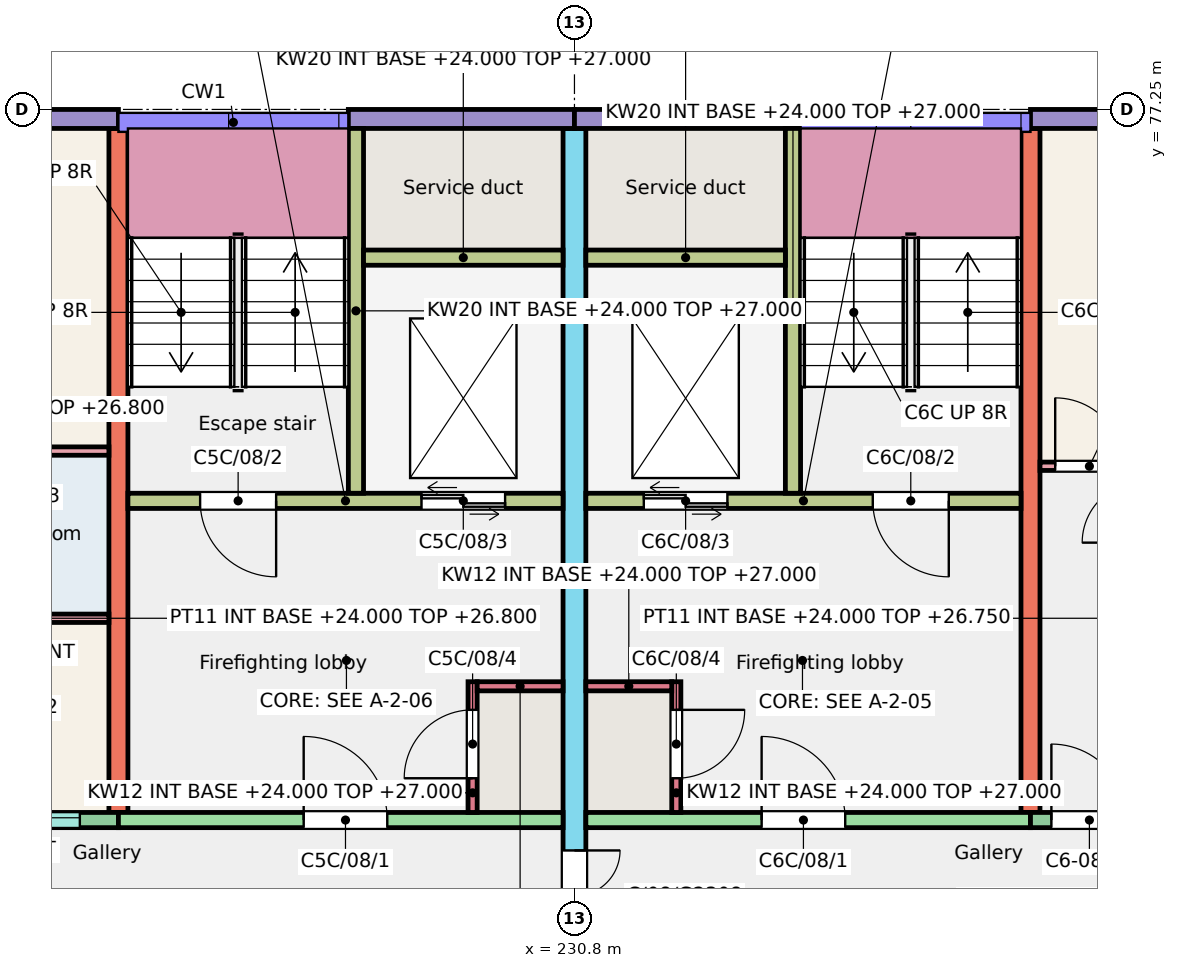
"""IFC4 building model, lengths in metres.
Left out: names, types, materials, properties, quantities, classifications, styles, units other than length and angle.
Written with IfcOpenShell. Run it as: python <this file> out.ifc"""

import sys

from ifc_helpers import new_model, si_unit, direction, frame, frame_2d, origin, place, context, subcontext, project, spatial, rectangle, extrude, element, fill, save


model = new_model("IFC4")
c1 = context("Model", 3, precision=1e-05, world=origin(), true_north=direction((0.0, 1.0)))
c2 = subcontext(c1, "Body", "Model", "MODEL_VIEW")
j1 = project(units=[si_unit("LENGTHUNIT", "METRE"), si_unit("PLANEANGLEUNIT", "RADIAN")], contexts=[c1])
p1 = place(None, origin())
s1 = spatial("IfcSite", under=j1, at=p1, CompositionType="ELEMENT")
p2 = place(p1, origin())
s2 = spatial("IfcBuilding", under=s1, at=p2, CompositionType="ELEMENT")
p3 = place(p2, frame((0.0, 0.0, 24.0)))
s3 = spatial("IfcBuildingStorey", under=s2, at=p3, CompositionType="ELEMENT", Elevation=24.0)
p4 = place(p3, frame((224.8, 68.0, 0.0), z_axis=(0.0, 0.0, 1.0), x_axis=(0.0, 1.0, 0.0)))
e1 = element("IfcWall", 1, at=p4, inside=s3, PredefinedType="SHEAR", context=c2, shape_type="SweptSolid", body=[
    extrude(rectangle(XDim=9.0, YDim=0.25, at=frame_2d((4.5, 0.0))), origin(), (0.0, 0.0, 1.0), 3.0),
])
p5 = place(p3, frame((230.8, 66.0, 0.0), z_axis=(0.0, 0.0, 1.0), x_axis=(0.0, 1.0, 0.0)))
e2 = element("IfcWall", 2, at=p5, inside=s3, PredefinedType="SHEAR", context=c2, shape_type="SweptSolid", body=[
    extrude(rectangle(XDim=11.0, YDim=0.3, at=frame_2d((5.5, 0.0))), origin(), (0.0, 0.0, 1.0), 3.0),
])
p6 = place(p5, frame((0.3, 0.0, 0.0)))
e3 = element("IfcOpeningElement", 3, at=p6, cuts=e2, PredefinedType="OPENING", context=c2, shape_type="SweptSolid", body=[
    extrude(rectangle(XDim=1.2, YDim=2.1, at=frame_2d((0.6, 1.05))), frame((0.0, 0.16, 0.0), z_axis=(0.0, -1.0, 0.0), x_axis=(1.0, 0.0, 0.0)), (0.0, 0.0, 1.0), 0.32),
])
p7 = place(p3, frame((236.8, 68.0, 0.0), z_axis=(0.0, 0.0, 1.0), x_axis=(0.0, 1.0, 0.0)))
e4 = element("IfcWall", 4, at=p7, inside=s3, PredefinedType="SHEAR", context=c2, shape_type="SweptSolid", body=[
    extrude(rectangle(XDim=9.0, YDim=0.25, at=frame_2d((4.5, 0.0))), origin(), (0.0, 0.0, 1.0), 3.0),
])
p8 = place(p3, frame((221.2, 77.125, 0.0), z_axis=(0.0, 0.0, 1.0), x_axis=(1.0, 0.0, 0.0)))
e5 = element("IfcWall", 5, at=p8, inside=s3, PredefinedType="SOLIDWALL", context=c2, shape_type="SweptSolid", body=[
    extrude(rectangle(XDim=3.6, YDim=0.25, at=frame_2d((1.8, 0.0))), origin(), (0.0, 0.0, 1.0), 3.0),
])
p9 = place(p8, frame((1.038, 0.0, 0.9)))
e6 = element("IfcOpeningElement", 6, at=p9, cuts=e5, PredefinedType="OPENING", context=c2, shape_type="SweptSolid", body=[
    extrude(rectangle(XDim=1.5, YDim=1.5, at=frame_2d((0.75, 0.75))), frame((0.0, 0.135, 0.0), z_axis=(0.0, -1.0, 0.0), x_axis=(1.0, 0.0, 0.0)), (0.0, 0.0, 1.0), 0.27),
])
p10 = place(p3, frame((221.2, 67.9, 0.0), z_axis=(0.0, 0.0, 1.0), x_axis=(1.0, 0.0, 0.0)))
e7 = element("IfcWall", 7, at=p10, inside=s3, PredefinedType="SOLIDWALL", context=c2, shape_type="SweptSolid", body=[
    extrude(rectangle(XDim=3.6, YDim=0.2, at=frame_2d((1.8, 0.0))), origin(), (0.0, 0.0, 1.0), 3.0),
])
p11 = place(p10, frame((1.893, 0.0, 1.1)))
e8 = element("IfcOpeningElement", 8, at=p11, cuts=e7, PredefinedType="OPENING", context=c2, shape_type="SweptSolid", body=[
    extrude(rectangle(XDim=1.2, YDim=1.3, at=frame_2d((0.6, 0.65))), frame((0.0, 0.11, 0.0), z_axis=(0.0, -1.0, 0.0), x_axis=(1.0, 0.0, 0.0)), (0.0, 0.0, 1.0), 0.22),
])
p12 = place(p10, frame((0.25, 0.0, 0.0)))
e9 = element("IfcOpeningElement", 9, at=p12, cuts=e7, PredefinedType="OPENING", context=c2, shape_type="SweptSolid", body=[
    extrude(rectangle(XDim=1.0, YDim=2.1, at=frame_2d((0.5, 1.05))), frame((0.0, 0.11, 0.0), z_axis=(0.0, -1.0, 0.0), x_axis=(1.0, 0.0, 0.0)), (0.0, 0.0, 1.0), 0.22),
])
p13 = place(p3, frame((227.825, 77.125, 0.0), z_axis=(0.0, 0.0, 1.0), x_axis=(1.0, 0.0, 0.0)))
e10 = element("IfcWall", 10, at=p13, inside=s3, PredefinedType="SOLIDWALL", context=c2, shape_type="SweptSolid", body=[
    extrude(rectangle(XDim=2.975, YDim=0.25, at=frame_2d((1.488, 0.0))), origin(), (0.0, 0.0, 1.0), 3.0),
])
p14 = place(p3, frame((224.8, 67.9, 0.0), z_axis=(0.0, 0.0, 1.0), x_axis=(1.0, 0.0, 0.0)))
e11 = element("IfcWall", 11, at=p14, inside=s3, PredefinedType="SHEAR", context=c2, shape_type="SweptSolid", body=[
    extrude(rectangle(XDim=5.85, YDim=0.2, at=frame_2d((2.925, 0.0))), origin(), (0.0, 0.0, 1.0), 3.0),
])
p15 = place(p14, frame((2.438, 0.0, 0.0)))
e12 = element("IfcOpeningElement", 12, at=p15, cuts=e11, PredefinedType="OPENING", context=c2, shape_type="SweptSolid", body=[
    extrude(rectangle(XDim=1.1, YDim=2.1, at=frame_2d((0.55, 1.05))), frame((0.0, 0.11, 0.0), z_axis=(0.0, -1.0, 0.0), x_axis=(1.0, 0.0, 0.0)), (0.0, 0.0, 1.0), 0.22),
])
p16 = place(p3, frame((224.925, 72.1, 0.0), z_axis=(0.0, 0.0, 1.0), x_axis=(1.0, 0.0, 0.0)))
e13 = element("IfcWall", 13, at=p16, inside=s3, PredefinedType="SHEAR", context=c2, shape_type="SweptSolid", body=[
    extrude(rectangle(XDim=5.725, YDim=0.2, at=frame_2d((2.862, 0.0))), origin(), (0.0, 0.0, 1.0), 3.0),
])
p17 = place(p16, frame((0.95, 0.0, 0.0)))
e14 = element("IfcOpeningElement", 14, at=p17, cuts=e13, PredefinedType="OPENING", context=c2, shape_type="SweptSolid", body=[
    extrude(rectangle(XDim=1.0, YDim=2.1, at=frame_2d((0.5, 1.05))), frame((0.0, 0.11, 0.0), z_axis=(0.0, -1.0, 0.0), x_axis=(1.0, 0.0, 0.0)), (0.0, 0.0, 1.0), 0.22),
])
p18 = place(p16, frame((3.863, 0.0, 0.0)))
e15 = element("IfcOpeningElement", 15, at=p18, cuts=e13, PredefinedType="OPENING", context=c2, shape_type="SweptSolid", body=[
    extrude(rectangle(XDim=1.1, YDim=2.1, at=frame_2d((0.55, 1.05))), frame((0.0, 0.11, 0.0), z_axis=(0.0, -1.0, 0.0), x_axis=(1.0, 0.0, 0.0)), (0.0, 0.0, 1.0), 0.22),
])
p19 = place(p3, frame((227.925, 72.2, 0.0), z_axis=(0.0, 0.0, 1.0), x_axis=(0.0, 1.0, 0.0)))
e16 = element("IfcWall", 16, at=p19, inside=s3, PredefinedType="SHEAR", context=c2, shape_type="SweptSolid", body=[
    extrude(rectangle(XDim=4.8, YDim=0.2, at=frame_2d((2.4, 0.0))), origin(), (0.0, 0.0, 1.0), 3.0),
])
p20 = place(p3, frame((228.025, 75.3, 0.0), z_axis=(0.0, 0.0, 1.0), x_axis=(1.0, 0.0, 0.0)))
e17 = element("IfcWall", 17, at=p20, inside=s3, PredefinedType="SHEAR", context=c2, shape_type="SweptSolid", body=[
    extrude(rectangle(XDim=2.625, YDim=0.2, at=frame_2d((1.312, 0.0))), origin(), (0.0, 0.0, 1.0), 3.0),
])
p21 = place(p3, frame((229.46, 68.0, 0.0), z_axis=(0.0, 0.0, 1.0), x_axis=(0.0, 1.0, 0.0)))
e18 = element("IfcWall", 18, at=p21, inside=s3, PredefinedType="SHEAR", context=c2, shape_type="SweptSolid", body=[
    extrude(rectangle(XDim=1.72, YDim=0.12, at=frame_2d((0.86, 0.0))), origin(), (0.0, 0.0, 1.0), 3.0),
])
p22 = place(p21, frame((0.45, 0.0, 0.0)))
e19 = element("IfcOpeningElement", 19, at=p22, cuts=e18, PredefinedType="OPENING", context=c2, shape_type="SweptSolid", body=[
    extrude(rectangle(XDim=0.9, YDim=2.1, at=frame_2d((0.45, 1.05))), frame((0.0, 0.07, 0.0), z_axis=(0.0, -1.0, 0.0), x_axis=(1.0, 0.0, 0.0)), (0.0, 0.0, 1.0), 0.14),
])
p23 = place(p3, frame((229.52, 69.66, 0.0), z_axis=(0.0, 0.0, 1.0), x_axis=(1.0, 0.0, 0.0)))
e20 = element("IfcWall", 20, at=p23, inside=s3, PredefinedType="SHEAR", context=c2, shape_type="SweptSolid", body=[
    extrude(rectangle(XDim=1.13, YDim=0.12, at=frame_2d((0.565, 0.0))), origin(), (0.0, 0.0, 1.0), 3.0),
])
p24 = place(p3, frame((230.8, 77.125, 0.0), z_axis=(0.0, 0.0, 1.0), x_axis=(1.0, 0.0, 0.0)))
e21 = element("IfcWall", 21, at=p24, inside=s3, PredefinedType="SOLIDWALL", context=c2, shape_type="SweptSolid", body=[
    extrude(rectangle(XDim=2.975, YDim=0.25, at=frame_2d((1.487, 0.0))), origin(), (0.0, 0.0, 1.0), 3.0),
])
p25 = place(p3, frame((230.95, 67.9, 0.0), z_axis=(0.0, 0.0, 1.0), x_axis=(1.0, 0.0, 0.0)))
e22 = element("IfcWall", 22, at=p25, inside=s3, PredefinedType="SHEAR", context=c2, shape_type="SweptSolid", body=[
    extrude(rectangle(XDim=5.85, YDim=0.2, at=frame_2d((2.925, 0.0))), origin(), (0.0, 0.0, 1.0), 3.0),
])
p26 = place(p25, frame((2.312, 0.0, 0.0)))
e23 = element("IfcOpeningElement", 23, at=p26, cuts=e22, PredefinedType="OPENING", context=c2, shape_type="SweptSolid", body=[
    extrude(rectangle(XDim=1.1, YDim=2.1, at=frame_2d((0.55, 1.05))), frame((0.0, 0.11, 0.0), z_axis=(0.0, -1.0, 0.0), x_axis=(1.0, 0.0, 0.0)), (0.0, 0.0, 1.0), 0.22),
])
p27 = place(p3, frame((230.95, 72.1, 0.0), z_axis=(0.0, 0.0, 1.0), x_axis=(1.0, 0.0, 0.0)))
e24 = element("IfcWall", 24, at=p27, inside=s3, PredefinedType="SHEAR", context=c2, shape_type="SweptSolid", body=[
    extrude(rectangle(XDim=5.725, YDim=0.2, at=frame_2d((2.863, 0.0))), origin(), (0.0, 0.0, 1.0), 3.0),
])
p28 = place(p27, frame((3.775, 0.0, 0.0)))
e25 = element("IfcOpeningElement", 25, at=p28, cuts=e24, PredefinedType="OPENING", context=c2, shape_type="SweptSolid", body=[
    extrude(rectangle(XDim=1.0, YDim=2.1, at=frame_2d((0.5, 1.05))), frame((0.0, 0.11, 0.0), z_axis=(0.0, -1.0, 0.0), x_axis=(1.0, 0.0, 0.0)), (0.0, 0.0, 1.0), 0.22),
])
p29 = place(p27, frame((0.762, 0.0, 0.0)))
e26 = element("IfcOpeningElement", 26, at=p29, cuts=e24, PredefinedType="OPENING", context=c2, shape_type="SweptSolid", body=[
    extrude(rectangle(XDim=1.1, YDim=2.1, at=frame_2d((0.55, 1.05))), frame((0.0, 0.11, 0.0), z_axis=(0.0, -1.0, 0.0), x_axis=(1.0, 0.0, 0.0)), (0.0, 0.0, 1.0), 0.22),
])
p30 = place(p3, frame((233.675, 72.2, 0.0), z_axis=(0.0, 0.0, 1.0), x_axis=(0.0, 1.0, 0.0)))
e27 = element("IfcWall", 27, at=p30, inside=s3, PredefinedType="SHEAR", context=c2, shape_type="SweptSolid", body=[
    extrude(rectangle(XDim=4.8, YDim=0.2, at=frame_2d((2.4, 0.0))), origin(), (0.0, 0.0, 1.0), 3.0),
])
p31 = place(p3, frame((230.95, 75.3, 0.0), z_axis=(0.0, 0.0, 1.0), x_axis=(1.0, 0.0, 0.0)))
e28 = element("IfcWall", 28, at=p31, inside=s3, PredefinedType="SHEAR", context=c2, shape_type="SweptSolid", body=[
    extrude(rectangle(XDim=2.625, YDim=0.2, at=frame_2d((1.312, 0.0))), origin(), (0.0, 0.0, 1.0), 3.0),
])
p32 = place(p3, frame((232.14, 68.0, 0.0), z_axis=(0.0, 0.0, 1.0), x_axis=(0.0, 1.0, 0.0)))
e29 = element("IfcWall", 29, at=p32, inside=s3, PredefinedType="SHEAR", context=c2, shape_type="SweptSolid", body=[
    extrude(rectangle(XDim=1.72, YDim=0.12, at=frame_2d((0.86, 0.0))), origin(), (0.0, 0.0, 1.0), 3.0),
])
p33 = place(p32, frame((0.45, 0.0, 0.0)))
e30 = element("IfcOpeningElement", 30, at=p33, cuts=e29, PredefinedType="OPENING", context=c2, shape_type="SweptSolid", body=[
    extrude(rectangle(XDim=0.9, YDim=2.1, at=frame_2d((0.45, 1.05))), frame((0.0, 0.07, 0.0), z_axis=(0.0, -1.0, 0.0), x_axis=(1.0, 0.0, 0.0)), (0.0, 0.0, 1.0), 0.14),
])
p34 = place(p3, frame((230.95, 69.66, 0.0), z_axis=(0.0, 0.0, 1.0), x_axis=(1.0, 0.0, 0.0)))
e31 = element("IfcWall", 31, at=p34, inside=s3, PredefinedType="SHEAR", context=c2, shape_type="SweptSolid", body=[
    extrude(rectangle(XDim=1.13, YDim=0.12, at=frame_2d((0.565, 0.0))), origin(), (0.0, 0.0, 1.0), 3.0),
])
p35 = place(p3, frame((236.8, 77.125, 0.0), z_axis=(0.0, 0.0, 1.0), x_axis=(1.0, 0.0, 0.0)))
e32 = element("IfcWall", 32, at=p35, inside=s3, PredefinedType="SOLIDWALL", context=c2, shape_type="SweptSolid", body=[
    extrude(rectangle(XDim=3.6, YDim=0.25, at=frame_2d((1.8, 0.0))), origin(), (0.0, 0.0, 1.0), 3.0),
])
p36 = place(p35, frame((1.062, 0.0, 0.9)))
e33 = element("IfcOpeningElement", 33, at=p36, cuts=e32, PredefinedType="OPENING", context=c2, shape_type="SweptSolid", body=[
    extrude(rectangle(XDim=1.5, YDim=1.5, at=frame_2d((0.75, 0.75))), frame((0.0, 0.135, 0.0), z_axis=(0.0, -1.0, 0.0), x_axis=(1.0, 0.0, 0.0)), (0.0, 0.0, 1.0), 0.27),
])
p37 = place(p3, frame((236.8, 67.9, 0.0), z_axis=(0.0, 0.0, 1.0), x_axis=(1.0, 0.0, 0.0)))
e34 = element("IfcWall", 34, at=p37, inside=s3, PredefinedType="SOLIDWALL", context=c2, shape_type="SweptSolid", body=[
    extrude(rectangle(XDim=3.6, YDim=0.2, at=frame_2d((1.8, 0.0))), origin(), (0.0, 0.0, 1.0), 3.0),
])
p38 = place(p37, frame((1.917, 0.0, 1.1)))
e35 = element("IfcOpeningElement", 35, at=p38, cuts=e34, PredefinedType="OPENING", context=c2, shape_type="SweptSolid", body=[
    extrude(rectangle(XDim=1.2, YDim=1.3, at=frame_2d((0.6, 0.65))), frame((0.0, 0.11, 0.0), z_axis=(0.0, -1.0, 0.0), x_axis=(1.0, 0.0, 0.0)), (0.0, 0.0, 1.0), 0.22),
])
p39 = place(p37, frame((0.275, 0.0, 0.0)))
e36 = element("IfcOpeningElement", 36, at=p39, cuts=e34, PredefinedType="OPENING", context=c2, shape_type="SweptSolid", body=[
    extrude(rectangle(XDim=1.0, YDim=2.1, at=frame_2d((0.5, 1.05))), frame((0.0, 0.11, 0.0), z_axis=(0.0, -1.0, 0.0), x_axis=(1.0, 0.0, 0.0)), (0.0, 0.0, 1.0), 0.22),
])
p40 = place(p3, frame((222.71, 70.555, 0.0), z_axis=(0.0, 0.0, 1.0), x_axis=(1.0, 0.0, 0.0)))
e37 = element("IfcWall", 37, at=p40, inside=s3, PredefinedType="PARTITIONING", context=c2, shape_type="SweptSolid", body=[
    extrude(rectangle(XDim=1.965, YDim=0.11, at=frame_2d((0.982, 0.0))), origin(), (0.0, 0.0, 1.0), 2.8),
])
p41 = place(p3, frame((221.3, 72.755, 0.0), z_axis=(0.0, 0.0, 1.0), x_axis=(1.0, 0.0, 0.0)))
e38 = element("IfcWall", 38, at=p41, inside=s3, PredefinedType="PARTITIONING", context=c2, shape_type="SweptSolid", body=[
    extrude(rectangle(XDim=3.375, YDim=0.11, at=frame_2d((1.688, 0.0))), origin(), (0.0, 0.0, 1.0), 2.8),
])
p42 = place(p41, frame((0.2, 0.0, 0.0)))
e39 = element("IfcOpeningElement", 39, at=p42, cuts=e38, PredefinedType="OPENING", context=c2, shape_type="SweptSolid", body=[
    extrude(rectangle(XDim=0.9, YDim=2.1, at=frame_2d((0.45, 1.05))), frame((0.0, 0.065, 0.0), z_axis=(0.0, -1.0, 0.0), x_axis=(1.0, 0.0, 0.0)), (0.0, 0.0, 1.0), 0.13),
])
p43 = place(p3, frame((236.925, 72.555, 0.0), z_axis=(0.0, 0.0, 1.0), x_axis=(1.0, 0.0, 0.0)))
e40 = element("IfcWall", 40, at=p43, inside=s3, PredefinedType="PARTITIONING", context=c2, shape_type="SweptSolid", body=[
    extrude(rectangle(XDim=3.375, YDim=0.11, at=frame_2d((1.688, 0.0))), origin(), (0.0, 0.0, 1.0), 2.75),
])
p44 = place(p43, frame((0.2, 0.0, 0.0)))
e41 = element("IfcOpeningElement", 41, at=p44, cuts=e40, PredefinedType="OPENING", context=c2, shape_type="SweptSolid", body=[
    extrude(rectangle(XDim=0.9, YDim=2.1, at=frame_2d((0.45, 1.05))), frame((0.0, 0.065, 0.0), z_axis=(0.0, -1.0, 0.0), x_axis=(1.0, 0.0, 0.0)), (0.0, 0.0, 1.0), 0.13),
])
p45 = place(p11, origin())
e42 = element("IfcWindow", 42, at=p45, inside=s3, PartitioningType="SINGLE_PANEL", PredefinedType="WINDOW", context=c2, shape_type="SweptSolid", body=[
    extrude(rectangle(XDim=1.2, YDim=1.3, at=frame_2d((0.6, 0.65))), frame((0.0, 0.06, 0.0), z_axis=(0.0, -1.0, 0.0), x_axis=(1.0, 0.0, 0.0)), (0.0, 0.0, 1.0), 0.06),
])
fill(e8, e42)
p46 = place(p39, origin())
e43 = element("IfcDoor", 43, at=p46, inside=s3, OperationType="SINGLE_SWING_LEFT", PredefinedType="DOOR", context=c2, shape_type="SweptSolid", body=[
    extrude(rectangle(XDim=1.0, YDim=2.1, at=frame_2d((0.5, 1.05))), frame((0.0, 0.025, 0.0), z_axis=(0.0, -1.0, 0.0), x_axis=(1.0, 0.0, 0.0)), (0.0, 0.0, 1.0), 0.05),
])
fill(e36, e43)
p47 = place(p44, origin())
e44 = element("IfcDoor", 44, at=p47, inside=s3, OperationType="SINGLE_SWING_LEFT", PredefinedType="DOOR", context=c2, shape_type="SweptSolid", body=[
    extrude(rectangle(XDim=0.9, YDim=2.1, at=frame_2d((0.45, 1.05))), frame((0.0, 0.025, 0.0), z_axis=(0.0, -1.0, 0.0), x_axis=(1.0, 0.0, 0.0)), (0.0, 0.0, 1.0), 0.05),
])
fill(e41, e44)
p48 = place(p15, origin())
e45 = element("IfcDoor", 45, at=p48, inside=s3, OperationType="SINGLE_SWING_LEFT", PredefinedType="DOOR", context=c2, shape_type="SweptSolid", body=[
    extrude(rectangle(XDim=1.1, YDim=2.1, at=frame_2d((0.55, 1.05))), frame((0.0, 0.025, 0.0), z_axis=(0.0, -1.0, 0.0), x_axis=(1.0, 0.0, 0.0)), (0.0, 0.0, 1.0), 0.05),
])
fill(e12, e45)
p49 = place(p17, origin())
e46 = element("IfcDoor", 46, at=p49, inside=s3, OperationType="SINGLE_SWING_RIGHT", PredefinedType="DOOR", context=c2, shape_type="SweptSolid", body=[
    extrude(rectangle(XDim=1.0, YDim=2.1, at=frame_2d((0.5, 1.05))), frame((0.0, 0.025, 0.0), z_axis=(0.0, -1.0, 0.0), x_axis=(1.0, 0.0, 0.0)), (0.0, 0.0, 1.0), 0.05),
])
fill(e14, e46)
p50 = place(p18, origin())
e47 = element("IfcDoor", 47, at=p50, inside=s3, OperationType="DOUBLE_DOOR_SLIDING", PredefinedType="DOOR", context=c2, shape_type="SweptSolid", body=[
    extrude(rectangle(XDim=1.1, YDim=2.1, at=frame_2d((0.55, 1.05))), frame((0.0, 0.025, 0.0), z_axis=(0.0, -1.0, 0.0), x_axis=(1.0, 0.0, 0.0)), (0.0, 0.0, 1.0), 0.05),
])
fill(e15, e47)
p51 = place(p22, origin())
e48 = element("IfcDoor", 48, at=p51, inside=s3, OperationType="SINGLE_SWING_LEFT", PredefinedType="DOOR", context=c2, shape_type="SweptSolid", body=[
    extrude(rectangle(XDim=0.9, YDim=2.1, at=frame_2d((0.45, 1.05))), frame((0.0, 0.025, 0.0), z_axis=(0.0, -1.0, 0.0), x_axis=(1.0, 0.0, 0.0)), (0.0, 0.0, 1.0), 0.05),
])
fill(e19, e48)
p52 = place(p26, origin())
e49 = element("IfcDoor", 49, at=p52, inside=s3, OperationType="SINGLE_SWING_LEFT", PredefinedType="DOOR", context=c2, shape_type="SweptSolid", body=[
    extrude(rectangle(XDim=1.1, YDim=2.1, at=frame_2d((0.55, 1.05))), frame((0.0, 0.025, 0.0), z_axis=(0.0, -1.0, 0.0), x_axis=(1.0, 0.0, 0.0)), (0.0, 0.0, 1.0), 0.05),
])
fill(e23, e49)
p53 = place(p28, origin())
e50 = element("IfcDoor", 50, at=p53, inside=s3, OperationType="SINGLE_SWING_RIGHT", PredefinedType="DOOR", context=c2, shape_type="SweptSolid", body=[
    extrude(rectangle(XDim=1.0, YDim=2.1, at=frame_2d((0.5, 1.05))), frame((0.0, 0.025, 0.0), z_axis=(0.0, -1.0, 0.0), x_axis=(1.0, 0.0, 0.0)), (0.0, 0.0, 1.0), 0.05),
])
fill(e25, e50)
p54 = place(p29, origin())
e51 = element("IfcDoor", 51, at=p54, inside=s3, OperationType="DOUBLE_DOOR_SLIDING", PredefinedType="DOOR", context=c2, shape_type="SweptSolid", body=[
    extrude(rectangle(XDim=1.1, YDim=2.1, at=frame_2d((0.55, 1.05))), frame((0.0, 0.025, 0.0), z_axis=(0.0, -1.0, 0.0), x_axis=(1.0, 0.0, 0.0)), (0.0, 0.0, 1.0), 0.05),
])
fill(e26, e51)
p55 = place(p33, origin())
e52 = element("IfcDoor", 52, at=p55, inside=s3, OperationType="SINGLE_SWING_RIGHT", PredefinedType="DOOR", context=c2, shape_type="SweptSolid", body=[
    extrude(rectangle(XDim=0.9, YDim=2.1, at=frame_2d((0.45, 1.05))), frame((0.0, 0.025, 0.0), z_axis=(0.0, -1.0, 0.0), x_axis=(1.0, 0.0, 0.0)), (0.0, 0.0, 1.0), 0.05),
])
fill(e30, e52)
p56 = place(p6, origin())
e53 = element("IfcDoor", 53, at=p56, inside=s3, OperationType="DOUBLE_DOOR_SINGLE_SWING", PredefinedType="DOOR", context=c2, shape_type="SweptSolid", body=[
    extrude(rectangle(XDim=1.2, YDim=2.1, at=frame_2d((0.6, 1.05))), frame((0.0, 0.025, 0.0), z_axis=(0.0, -1.0, 0.0), x_axis=(1.0, 0.0, 0.0)), (0.0, 0.0, 1.0), 0.05),
])
fill(e3, e53)
save(model, sys.argv[1])
